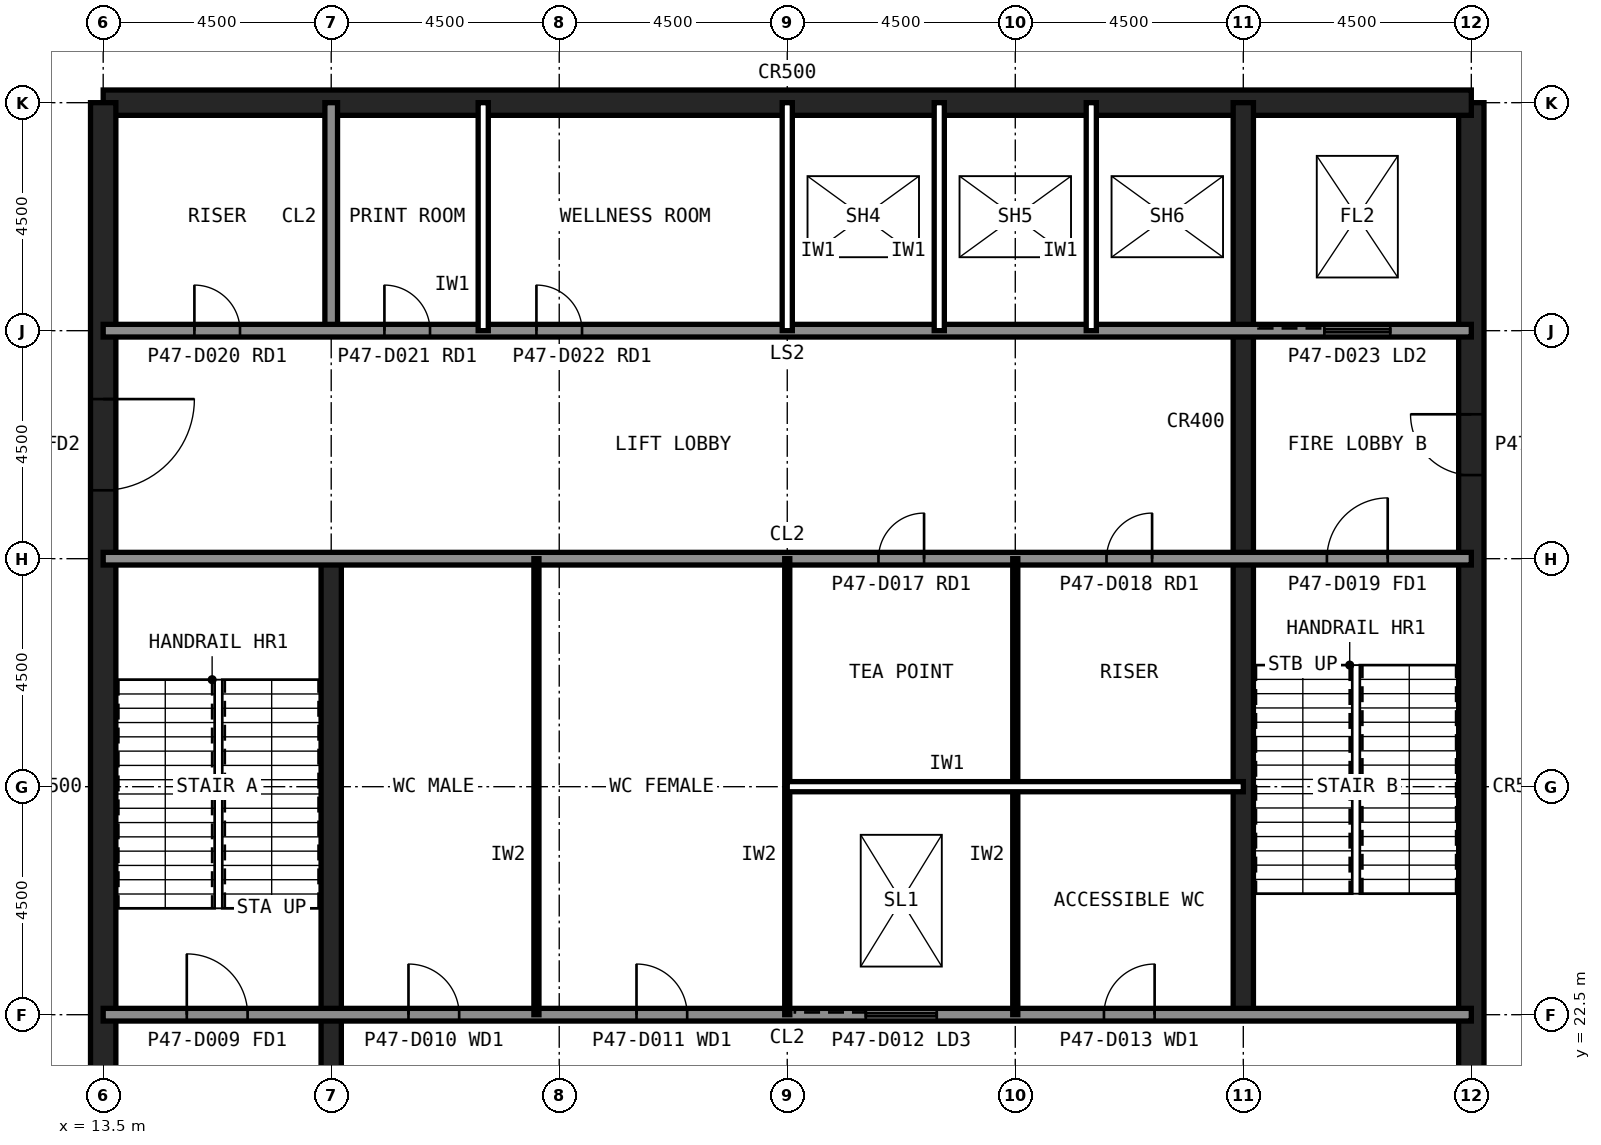
"""IFC4 building model, lengths in metres.
Left out: names, types, materials, properties, quantities, classifications, styles, units other than length and angle.
Written with IfcOpenShell. Run it as: python <this file> out.ifc"""

import sys

from ifc_helpers import new_model, si_unit, direction, frame, frame_2d, origin, place, context, subcontext, project, spatial, rectangle, extrude, element, fill, save


model = new_model("IFC4")
c1 = context("Model", 3, precision=1e-05, world=origin(), true_north=direction((0.0, 1.0)))
c2 = subcontext(c1, "Body", "Model", "MODEL_VIEW")
j1 = project(units=[si_unit("LENGTHUNIT", "METRE"), si_unit("PLANEANGLEUNIT", "RADIAN")], contexts=[c1])
p1 = place(None, origin())
s1 = spatial("IfcSite", under=j1, at=p1, CompositionType="ELEMENT")
p2 = place(p1, origin())
s2 = spatial("IfcBuilding", under=s1, at=p2, CompositionType="ELEMENT")
p3 = place(p2, frame((0.0, 0.0, 199.6)))
s3 = spatial("IfcBuildingStorey", under=s2, at=p3, CompositionType="ELEMENT", Elevation=199.6)
p4 = place(p3, frame((40.5, 13.5, 0.0), z_axis=(0.0, 0.0, 1.0), x_axis=(0.0, 1.0, 0.0)))
e1 = element("IfcWall", 1, at=p4, inside=s3, PredefinedType="SHEAR", context=c2, shape_type="SweptSolid", body=[
    extrude(rectangle(XDim=27.0, YDim=0.5, at=frame_2d((13.5, 0.0))), origin(), (0.0, 0.0, 1.0), 6.0),
])
p5 = place(p4, frame((5.85, 0.0, 0.0)))
e2 = element("IfcOpeningElement", 2, at=p5, cuts=e1, PredefinedType="OPENING", context=c2, shape_type="SweptSolid", body=[
    extrude(rectangle(XDim=1.8, YDim=2.1, at=frame_2d((0.9, 1.05))), frame((0.0, 0.26, 0.0), z_axis=(0.0, -1.0, 0.0), x_axis=(1.0, 0.0, 0.0)), (0.0, 0.0, 1.0), 0.52),
])
p6 = place(p4, frame((19.65, 0.0, 0.0)))
e3 = element("IfcOpeningElement", 3, at=p6, cuts=e1, PredefinedType="OPENING", context=c2, shape_type="SweptSolid", body=[
    extrude(rectangle(XDim=1.2, YDim=2.1, at=frame_2d((0.6, 1.05))), frame((0.0, 0.26, 0.0), z_axis=(0.0, -1.0, 0.0), x_axis=(1.0, 0.0, 0.0)), (0.0, 0.0, 1.0), 0.52),
])
p7 = place(p3, frame((40.5, 40.5, 0.0), z_axis=(0.0, 0.0, 1.0), x_axis=(-1.0, 0.0, 0.0)))
e4 = element("IfcWall", 4, at=p7, inside=s3, PredefinedType="SHEAR", context=c2, shape_type="SweptSolid", body=[
    extrude(rectangle(XDim=27.0, YDim=0.5, at=frame_2d((13.5, 0.0))), origin(), (0.0, 0.0, 1.0), 6.0),
])
p8 = place(p3, frame((13.5, 40.5, 0.0), z_axis=(0.0, 0.0, 1.0), x_axis=(0.0, -1.0, 0.0)))
e5 = element("IfcWall", 5, at=p8, inside=s3, PredefinedType="SHEAR", context=c2, shape_type="SweptSolid", body=[
    extrude(rectangle(XDim=27.0, YDim=0.5, at=frame_2d((13.5, 0.0))), origin(), (0.0, 0.0, 1.0), 6.0),
])
p9 = place(p8, frame((19.65, 0.0, 0.0)))
e6 = element("IfcOpeningElement", 6, at=p9, cuts=e5, PredefinedType="OPENING", context=c2, shape_type="SweptSolid", body=[
    extrude(rectangle(XDim=1.2, YDim=2.1, at=frame_2d((0.6, 1.05))), frame((0.0, 0.26, 0.0), z_axis=(0.0, -1.0, 0.0), x_axis=(1.0, 0.0, 0.0)), (0.0, 0.0, 1.0), 0.52),
])
p10 = place(p8, frame((5.85, 0.0, 0.0)))
e7 = element("IfcOpeningElement", 7, at=p10, cuts=e5, PredefinedType="OPENING", context=c2, shape_type="SweptSolid", body=[
    extrude(rectangle(XDim=1.8, YDim=2.1, at=frame_2d((0.9, 1.05))), frame((0.0, 0.26, 0.0), z_axis=(0.0, -1.0, 0.0), x_axis=(1.0, 0.0, 0.0)), (0.0, 0.0, 1.0), 0.52),
])
p11 = place(p3, frame((18.0, 13.5, 0.0), z_axis=(0.0, 0.0, 1.0), x_axis=(0.0, 1.0, 0.0)))
e8 = element("IfcWall", 8, at=p11, inside=s3, PredefinedType="SHEAR", context=c2, shape_type="SweptSolid", body=[
    extrude(rectangle(XDim=18.0, YDim=0.4, at=frame_2d((9.0, 0.0))), origin(), (0.0, 0.0, 1.0), 6.0),
])
p12 = place(p3, frame((18.0, 36.0, 0.0), z_axis=(0.0, 0.0, 1.0), x_axis=(0.0, 1.0, 0.0)))
e9 = element("IfcWall", 9, at=p12, inside=s3, PredefinedType="SOLIDWALL", context=c2, shape_type="SweptSolid", body=[
    extrude(rectangle(XDim=4.5, YDim=0.25, at=frame_2d((2.25, 0.0))), origin(), (0.0, 0.0, 1.0), 5.82),
])
p13 = place(p3, frame((36.0, 22.5, 0.0), z_axis=(0.0, 0.0, 1.0), x_axis=(0.0, 1.0, 0.0)))
e10 = element("IfcWall", 10, at=p13, inside=s3, PredefinedType="SHEAR", context=c2, shape_type="SweptSolid", body=[
    extrude(rectangle(XDim=18.0, YDim=0.4, at=frame_2d((9.0, 0.0))), origin(), (0.0, 0.0, 1.0), 6.0),
])
p14 = place(p3, frame((13.5, 36.0, 0.0), z_axis=(0.0, 0.0, 1.0), x_axis=(1.0, 0.0, 0.0)))
e11 = element("IfcWall", 11, at=p14, inside=s3, PredefinedType="SOLIDWALL", context=c2, shape_type="SweptSolid", body=[
    extrude(rectangle(XDim=27.0, YDim=0.25, at=frame_2d((13.5, 0.0))), origin(), (0.0, 0.0, 1.0), 5.82),
])
p15 = place(p14, frame((1.8, 0.0, 0.0)))
e12 = element("IfcOpeningElement", 12, at=p15, cuts=e11, PredefinedType="OPENING", context=c2, shape_type="SweptSolid", body=[
    extrude(rectangle(XDim=0.9, YDim=2.1, at=frame_2d((0.45, 1.05))), frame((0.0, 0.135, 0.0), z_axis=(0.0, -1.0, 0.0), x_axis=(1.0, 0.0, 0.0)), (0.0, 0.0, 1.0), 0.27),
])
p16 = place(p14, frame((5.55, 0.0, 0.0)))
e13 = element("IfcOpeningElement", 13, at=p16, cuts=e11, PredefinedType="OPENING", context=c2, shape_type="SweptSolid", body=[
    extrude(rectangle(XDim=0.9, YDim=2.1, at=frame_2d((0.45, 1.05))), frame((0.0, 0.135, 0.0), z_axis=(0.0, -1.0, 0.0), x_axis=(1.0, 0.0, 0.0)), (0.0, 0.0, 1.0), 0.27),
])
p17 = place(p14, frame((8.55, 0.0, 0.0)))
e14 = element("IfcOpeningElement", 14, at=p17, cuts=e11, PredefinedType="OPENING", context=c2, shape_type="SweptSolid", body=[
    extrude(rectangle(XDim=0.9, YDim=2.1, at=frame_2d((0.45, 1.05))), frame((0.0, 0.135, 0.0), z_axis=(0.0, -1.0, 0.0), x_axis=(1.0, 0.0, 0.0)), (0.0, 0.0, 1.0), 0.27),
])
p18 = place(p14, frame((24.1, 0.0, 0.0)))
e15 = element("IfcOpeningElement", 15, at=p18, cuts=e11, PredefinedType="OPENING", context=c2, shape_type="SweptSolid", body=[
    extrude(rectangle(XDim=1.3, YDim=2.2, at=frame_2d((0.65, 1.1))), frame((0.0, 0.135, 0.0), z_axis=(0.0, -1.0, 0.0), x_axis=(1.0, 0.0, 0.0)), (0.0, 0.0, 1.0), 0.27),
])
p19 = place(p3, frame((13.5, 22.5, 0.0), z_axis=(0.0, 0.0, 1.0), x_axis=(1.0, 0.0, 0.0)))
e16 = element("IfcWall", 16, at=p19, inside=s3, PredefinedType="SOLIDWALL", context=c2, shape_type="SweptSolid", body=[
    extrude(rectangle(XDim=27.0, YDim=0.25, at=frame_2d((13.5, 0.0))), origin(), (0.0, 0.0, 1.0), 5.82),
])
p20 = place(p19, frame((1.65, 0.0, 0.0)))
e17 = element("IfcOpeningElement", 17, at=p20, cuts=e16, PredefinedType="OPENING", context=c2, shape_type="SweptSolid", body=[
    extrude(rectangle(XDim=1.2, YDim=2.1, at=frame_2d((0.6, 1.05))), frame((0.0, 0.135, 0.0), z_axis=(0.0, -1.0, 0.0), x_axis=(1.0, 0.0, 0.0)), (0.0, 0.0, 1.0), 0.27),
])
p21 = place(p19, frame((6.025, 0.0, 0.0)))
e18 = element("IfcOpeningElement", 18, at=p21, cuts=e16, PredefinedType="OPENING", context=c2, shape_type="SweptSolid", body=[
    extrude(rectangle(XDim=1.0, YDim=2.1, at=frame_2d((0.5, 1.05))), frame((0.0, 0.135, 0.0), z_axis=(0.0, -1.0, 0.0), x_axis=(1.0, 0.0, 0.0)), (0.0, 0.0, 1.0), 0.27),
])
p22 = place(p19, frame((10.525, 0.0, 0.0)))
e19 = element("IfcOpeningElement", 19, at=p22, cuts=e16, PredefinedType="OPENING", context=c2, shape_type="SweptSolid", body=[
    extrude(rectangle(XDim=1.0, YDim=2.1, at=frame_2d((0.5, 1.05))), frame((0.0, 0.135, 0.0), z_axis=(0.0, -1.0, 0.0), x_axis=(1.0, 0.0, 0.0)), (0.0, 0.0, 1.0), 0.27),
])
p23 = place(p19, frame((19.75, 0.0, 0.0)))
e20 = element("IfcOpeningElement", 20, at=p23, cuts=e16, PredefinedType="OPENING", context=c2, shape_type="SweptSolid", body=[
    extrude(rectangle(XDim=1.0, YDim=2.1, at=frame_2d((0.5, 1.05))), frame((0.0, 0.135, 0.0), z_axis=(0.0, -1.0, 0.0), x_axis=(1.0, 0.0, 0.0)), (0.0, 0.0, 1.0), 0.27),
])
p24 = place(p19, frame((15.05, 0.0, 0.0)))
e21 = element("IfcOpeningElement", 21, at=p24, cuts=e16, PredefinedType="OPENING", context=c2, shape_type="SweptSolid", body=[
    extrude(rectangle(XDim=1.4, YDim=2.4, at=frame_2d((0.7, 1.2))), frame((0.0, 0.135, 0.0), z_axis=(0.0, -1.0, 0.0), x_axis=(1.0, 0.0, 0.0)), (0.0, 0.0, 1.0), 0.27),
])
p25 = place(p3, frame((13.5, 31.5, 0.0), z_axis=(0.0, 0.0, 1.0), x_axis=(1.0, 0.0, 0.0)))
e22 = element("IfcWall", 22, at=p25, inside=s3, PredefinedType="SOLIDWALL", context=c2, shape_type="SweptSolid", body=[
    extrude(rectangle(XDim=27.0, YDim=0.25, at=frame_2d((13.5, 0.0))), origin(), (0.0, 0.0, 1.0), 5.82),
])
p26 = place(p25, frame((24.15, 0.0, 0.0)))
e23 = element("IfcOpeningElement", 23, at=p26, cuts=e22, PredefinedType="OPENING", context=c2, shape_type="SweptSolid", body=[
    extrude(rectangle(XDim=1.2, YDim=2.1, at=frame_2d((0.6, 1.05))), frame((0.0, 0.135, 0.0), z_axis=(0.0, -1.0, 0.0), x_axis=(1.0, 0.0, 0.0)), (0.0, 0.0, 1.0), 0.27),
])
p27 = place(p25, frame((15.3, 0.0, 0.0)))
e24 = element("IfcOpeningElement", 24, at=p27, cuts=e22, PredefinedType="OPENING", context=c2, shape_type="SweptSolid", body=[
    extrude(rectangle(XDim=0.9, YDim=2.1, at=frame_2d((0.45, 1.05))), frame((0.0, 0.135, 0.0), z_axis=(0.0, -1.0, 0.0), x_axis=(1.0, 0.0, 0.0)), (0.0, 0.0, 1.0), 0.27),
])
p28 = place(p25, frame((19.8, 0.0, 0.0)))
e25 = element("IfcOpeningElement", 25, at=p28, cuts=e22, PredefinedType="OPENING", context=c2, shape_type="SweptSolid", body=[
    extrude(rectangle(XDim=0.9, YDim=2.1, at=frame_2d((0.45, 1.05))), frame((0.0, 0.135, 0.0), z_axis=(0.0, -1.0, 0.0), x_axis=(1.0, 0.0, 0.0)), (0.0, 0.0, 1.0), 0.27),
])
p29 = place(p3, frame((36.261, 54.63, 0.0), z_axis=(0.0, 0.0, 1.0), x_axis=(0.707106781187, -0.707106781187, 0.0)))
e26 = element("IfcWall", 26, at=p29, inside=s3, PredefinedType="SOLIDWALL", context=c2, shape_type="SweptSolid", body=[
    extrude(rectangle(XDim=25.978, YDim=0.3, at=frame_2d((12.989, 0.0))), origin(), (0.0, 0.0, 1.0), 6.0),
])
p30 = place(p29, frame((0.424, 0.0, 1.2)))
e27 = element("IfcOpeningElement", 27, at=p30, cuts=e26, PredefinedType="OPENING", context=c2, shape_type="SweptSolid", body=[
    extrude(rectangle(XDim=2.4, YDim=3.0, at=frame_2d((1.2, 1.5))), frame((0.0, 0.16, 0.0), z_axis=(0.0, -1.0, 0.0), x_axis=(1.0, 0.0, 0.0)), (0.0, 0.0, 1.0), 0.32),
])
p31 = place(p29, frame((3.671, 0.0, 1.2)))
e28 = element("IfcOpeningElement", 28, at=p31, cuts=e26, PredefinedType="OPENING", context=c2, shape_type="SweptSolid", body=[
    extrude(rectangle(XDim=2.4, YDim=3.0, at=frame_2d((1.2, 1.5))), frame((0.0, 0.16, 0.0), z_axis=(0.0, -1.0, 0.0), x_axis=(1.0, 0.0, 0.0)), (0.0, 0.0, 1.0), 0.32),
])
p32 = place(p29, frame((6.918, 0.0, 1.2)))
e29 = element("IfcOpeningElement", 29, at=p32, cuts=e26, PredefinedType="OPENING", context=c2, shape_type="SweptSolid", body=[
    extrude(rectangle(XDim=2.4, YDim=3.0, at=frame_2d((1.2, 1.5))), frame((0.0, 0.16, 0.0), z_axis=(0.0, -1.0, 0.0), x_axis=(1.0, 0.0, 0.0)), (0.0, 0.0, 1.0), 0.32),
])
p33 = place(p29, frame((10.165, 0.0, 1.2)))
e30 = element("IfcOpeningElement", 30, at=p33, cuts=e26, PredefinedType="OPENING", context=c2, shape_type="SweptSolid", body=[
    extrude(rectangle(XDim=2.4, YDim=3.0, at=frame_2d((1.2, 1.5))), frame((0.0, 0.16, 0.0), z_axis=(0.0, -1.0, 0.0), x_axis=(1.0, 0.0, 0.0)), (0.0, 0.0, 1.0), 0.32),
])
p34 = place(p29, frame((13.412, 0.0, 1.2)))
e31 = element("IfcOpeningElement", 31, at=p34, cuts=e26, PredefinedType="OPENING", context=c2, shape_type="SweptSolid", body=[
    extrude(rectangle(XDim=2.4, YDim=3.0, at=frame_2d((1.2, 1.5))), frame((0.0, 0.16, 0.0), z_axis=(0.0, -1.0, 0.0), x_axis=(1.0, 0.0, 0.0)), (0.0, 0.0, 1.0), 0.32),
])
p35 = place(p29, frame((16.66, 0.0, 1.2)))
e32 = element("IfcOpeningElement", 32, at=p35, cuts=e26, PredefinedType="OPENING", context=c2, shape_type="SweptSolid", body=[
    extrude(rectangle(XDim=2.4, YDim=3.0, at=frame_2d((1.2, 1.5))), frame((0.0, 0.16, 0.0), z_axis=(0.0, -1.0, 0.0), x_axis=(1.0, 0.0, 0.0)), (0.0, 0.0, 1.0), 0.32),
])
p36 = place(p29, frame((19.907, 0.0, 1.2)))
e33 = element("IfcOpeningElement", 33, at=p36, cuts=e26, PredefinedType="OPENING", context=c2, shape_type="SweptSolid", body=[
    extrude(rectangle(XDim=2.4, YDim=3.0, at=frame_2d((1.2, 1.5))), frame((0.0, 0.16, 0.0), z_axis=(0.0, -1.0, 0.0), x_axis=(1.0, 0.0, 0.0)), (0.0, 0.0, 1.0), 0.32),
])
p37 = place(p29, frame((23.154, 0.0, 1.2)))
e34 = element("IfcOpeningElement", 34, at=p37, cuts=e26, PredefinedType="OPENING", context=c2, shape_type="SweptSolid", body=[
    extrude(rectangle(XDim=2.4, YDim=3.0, at=frame_2d((1.2, 1.5))), frame((0.0, 0.16, 0.0), z_axis=(0.0, -1.0, 0.0), x_axis=(1.0, 0.0, 0.0)), (0.0, 0.0, 1.0), 0.32),
])
for number, where, z_axis, x_axis in (
    (35, (21.0, 36.0, 0.0), (0.0, 0.0, 1.0), (0.0, 1.0, 0.0)),
    (36, (27.0, 36.0, 0.0), (0.0, 0.0, 1.0), (0.0, 1.0, 0.0)),
    (37, (30.0, 36.0, 0.0), (0.0, 0.0, 1.0), (0.0, 1.0, 0.0)),
    (38, (33.0, 36.0, 0.0), (0.0, 0.0, 1.0), (0.0, 1.0, 0.0)),
):
    element("IfcWall", number, at=place(p3, frame(where, z_axis=z_axis, x_axis=x_axis)), inside=s3, PredefinedType="PARTITIONING", context=c2, shape_type="SweptSolid", body=[
        extrude(rectangle(XDim=4.5, YDim=0.2, at=frame_2d((2.25, 0.0))), origin(), (0.0, 0.0, 1.0), 5.82),
    ])
for number, where, z_axis, x_axis in (
    (39, (22.05, 22.5, 0.0), (0.0, 0.0, 1.0), (0.0, 1.0, 0.0)),
    (40, (27.0, 22.5, 0.0), (0.0, 0.0, 1.0), (0.0, 1.0, 0.0)),
    (41, (31.5, 22.5, 0.0), (0.0, 0.0, 1.0), (0.0, 1.0, 0.0)),
):
    element("IfcWall", number, at=place(p3, frame(where, z_axis=z_axis, x_axis=x_axis)), inside=s3, PredefinedType="PLUMBINGWALL", context=c2, shape_type="SweptSolid", body=[
        extrude(rectangle(XDim=9.0, YDim=0.1, at=frame_2d((4.5, 0.0))), origin(), (0.0, 0.0, 1.0), 5.82),
    ])
p38 = place(p3, frame((27.0, 27.0, 0.0), z_axis=(0.0, 0.0, 1.0), x_axis=(1.0, 0.0, 0.0)))
e42 = element("IfcWall", 42, at=p38, inside=s3, PredefinedType="PARTITIONING", context=c2, shape_type="SweptSolid", body=[
    extrude(rectangle(XDim=9.0, YDim=0.2, at=frame_2d((4.5, 0.0))), origin(), (0.0, 0.0, 1.0), 5.82),
])
p39 = place(p10, origin())
e43 = element("IfcDoor", 43, at=p39, inside=s3, OperationType="SINGLE_SWING_LEFT", PredefinedType="DOOR", context=c2, shape_type="SweptSolid", body=[
    extrude(rectangle(XDim=1.8, YDim=2.1, at=frame_2d((0.9, 1.05))), frame((0.0, 0.025, 0.0), z_axis=(0.0, -1.0, 0.0), x_axis=(1.0, 0.0, 0.0)), (0.0, 0.0, 1.0), 0.05),
])
fill(e7, e43)
p40 = place(p6, origin())
e44 = element("IfcDoor", 44, at=p40, inside=s3, OperationType="SINGLE_SWING_RIGHT", PredefinedType="DOOR", context=c2, shape_type="SweptSolid", body=[
    extrude(rectangle(XDim=1.2, YDim=2.1, at=frame_2d((0.6, 1.05))), frame((0.0, 0.025, 0.0), z_axis=(0.0, -1.0, 0.0), x_axis=(1.0, 0.0, 0.0)), (0.0, 0.0, 1.0), 0.05),
])
fill(e3, e44)
p41 = place(p20, origin())
e45 = element("IfcDoor", 45, at=p41, inside=s3, OperationType="SINGLE_SWING_LEFT", PredefinedType="DOOR", context=c2, shape_type="SweptSolid", body=[
    extrude(rectangle(XDim=1.2, YDim=2.1, at=frame_2d((0.6, 1.05))), frame((0.0, 0.025, 0.0), z_axis=(0.0, -1.0, 0.0), x_axis=(1.0, 0.0, 0.0)), (0.0, 0.0, 1.0), 0.05),
])
fill(e17, e45)
p42 = place(p26, origin())
e46 = element("IfcDoor", 46, at=p42, inside=s3, OperationType="SINGLE_SWING_RIGHT", PredefinedType="DOOR", context=c2, shape_type="SweptSolid", body=[
    extrude(rectangle(XDim=1.2, YDim=2.1, at=frame_2d((0.6, 1.05))), frame((0.0, 0.025, 0.0), z_axis=(0.0, -1.0, 0.0), x_axis=(1.0, 0.0, 0.0)), (0.0, 0.0, 1.0), 0.05),
])
fill(e23, e46)
p43 = place(p21, origin())
e47 = element("IfcDoor", 47, at=p43, inside=s3, OperationType="SINGLE_SWING_LEFT", PredefinedType="DOOR", context=c2, shape_type="SweptSolid", body=[
    extrude(rectangle(XDim=1.0, YDim=2.1, at=frame_2d((0.5, 1.05))), frame((0.0, 0.025, 0.0), z_axis=(0.0, -1.0, 0.0), x_axis=(1.0, 0.0, 0.0)), (0.0, 0.0, 1.0), 0.05),
])
fill(e18, e47)
p44 = place(p22, origin())
e48 = element("IfcDoor", 48, at=p44, inside=s3, OperationType="SINGLE_SWING_LEFT", PredefinedType="DOOR", context=c2, shape_type="SweptSolid", body=[
    extrude(rectangle(XDim=1.0, YDim=2.1, at=frame_2d((0.5, 1.05))), frame((0.0, 0.025, 0.0), z_axis=(0.0, -1.0, 0.0), x_axis=(1.0, 0.0, 0.0)), (0.0, 0.0, 1.0), 0.05),
])
fill(e19, e48)
p45 = place(p23, origin())
e49 = element("IfcDoor", 49, at=p45, inside=s3, OperationType="SINGLE_SWING_RIGHT", PredefinedType="DOOR", context=c2, shape_type="SweptSolid", body=[
    extrude(rectangle(XDim=1.0, YDim=2.1, at=frame_2d((0.5, 1.05))), frame((0.0, 0.025, 0.0), z_axis=(0.0, -1.0, 0.0), x_axis=(1.0, 0.0, 0.0)), (0.0, 0.0, 1.0), 0.05),
])
fill(e20, e49)
p46 = place(p27, origin())
e50 = element("IfcDoor", 50, at=p46, inside=s3, OperationType="SINGLE_SWING_RIGHT", PredefinedType="DOOR", context=c2, shape_type="SweptSolid", body=[
    extrude(rectangle(XDim=0.9, YDim=2.1, at=frame_2d((0.45, 1.05))), frame((0.0, 0.025, 0.0), z_axis=(0.0, -1.0, 0.0), x_axis=(1.0, 0.0, 0.0)), (0.0, 0.0, 1.0), 0.05),
])
fill(e24, e50)
p47 = place(p28, origin())
e51 = element("IfcDoor", 51, at=p47, inside=s3, OperationType="SINGLE_SWING_RIGHT", PredefinedType="DOOR", context=c2, shape_type="SweptSolid", body=[
    extrude(rectangle(XDim=0.9, YDim=2.1, at=frame_2d((0.45, 1.05))), frame((0.0, 0.025, 0.0), z_axis=(0.0, -1.0, 0.0), x_axis=(1.0, 0.0, 0.0)), (0.0, 0.0, 1.0), 0.05),
])
fill(e25, e51)
p48 = place(p15, origin())
e52 = element("IfcDoor", 52, at=p48, inside=s3, OperationType="SINGLE_SWING_LEFT", PredefinedType="DOOR", context=c2, shape_type="SweptSolid", body=[
    extrude(rectangle(XDim=0.9, YDim=2.1, at=frame_2d((0.45, 1.05))), frame((0.0, 0.025, 0.0), z_axis=(0.0, -1.0, 0.0), x_axis=(1.0, 0.0, 0.0)), (0.0, 0.0, 1.0), 0.05),
])
fill(e12, e52)
p49 = place(p16, origin())
e53 = element("IfcDoor", 53, at=p49, inside=s3, OperationType="SINGLE_SWING_LEFT", PredefinedType="DOOR", context=c2, shape_type="SweptSolid", body=[
    extrude(rectangle(XDim=0.9, YDim=2.1, at=frame_2d((0.45, 1.05))), frame((0.0, 0.025, 0.0), z_axis=(0.0, -1.0, 0.0), x_axis=(1.0, 0.0, 0.0)), (0.0, 0.0, 1.0), 0.05),
])
fill(e13, e53)
p50 = place(p17, origin())
e54 = element("IfcDoor", 54, at=p50, inside=s3, OperationType="SINGLE_SWING_LEFT", PredefinedType="DOOR", context=c2, shape_type="SweptSolid", body=[
    extrude(rectangle(XDim=0.9, YDim=2.1, at=frame_2d((0.45, 1.05))), frame((0.0, 0.025, 0.0), z_axis=(0.0, -1.0, 0.0), x_axis=(1.0, 0.0, 0.0)), (0.0, 0.0, 1.0), 0.05),
])
fill(e14, e54)
p51 = place(p18, origin())
e55 = element("IfcDoor", 55, at=p51, inside=s3, OperationType="SLIDING_TO_LEFT", PredefinedType="DOOR", context=c2, shape_type="SweptSolid", body=[
    extrude(rectangle(XDim=1.3, YDim=2.2, at=frame_2d((0.65, 1.1))), frame((0.0, 0.025, 0.0), z_axis=(0.0, -1.0, 0.0), x_axis=(1.0, 0.0, 0.0)), (0.0, 0.0, 1.0), 0.05),
])
fill(e15, e55)
p52 = place(p24, origin())
e56 = element("IfcDoor", 56, at=p52, inside=s3, OperationType="SLIDING_TO_LEFT", PredefinedType="DOOR", context=c2, shape_type="SweptSolid", body=[
    extrude(rectangle(XDim=1.4, YDim=2.4, at=frame_2d((0.7, 1.2))), frame((0.0, 0.025, 0.0), z_axis=(0.0, -1.0, 0.0), x_axis=(1.0, 0.0, 0.0)), (0.0, 0.0, 1.0), 0.05),
])
fill(e21, e56)
save(model, sys.argv[1])
